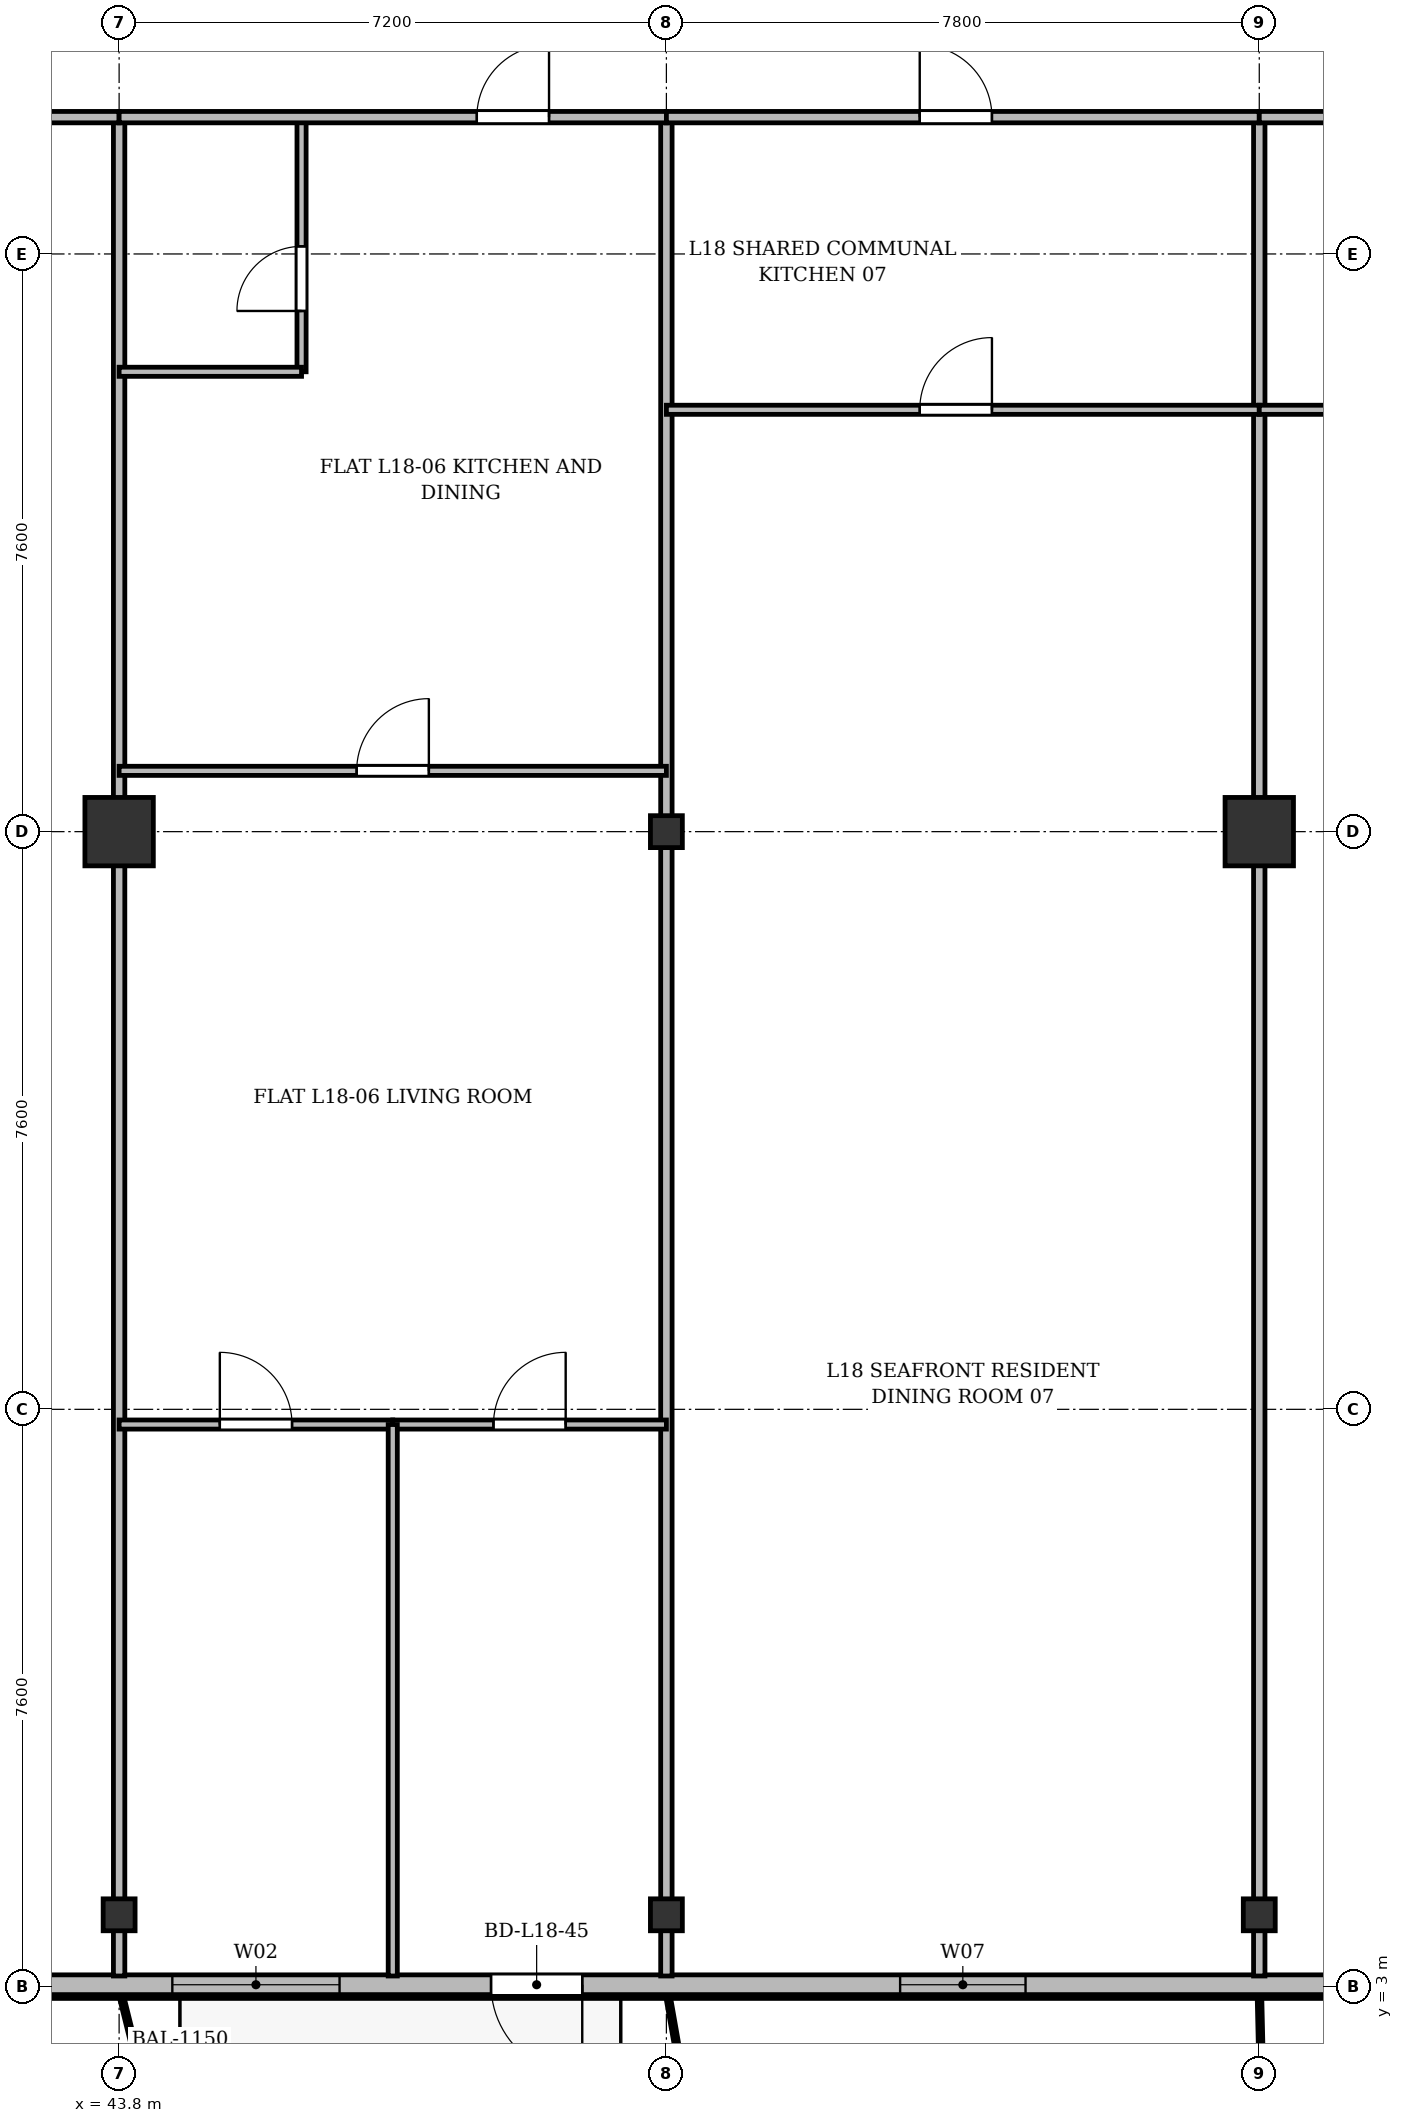
"""IFC4 building model, lengths in metres.
Left out: names, types, materials, properties, quantities, classifications, styles, units other than length and angle.
Written with IfcOpenShell. Run it as: python <this file> out.ifc"""

import sys

from ifc_helpers import new_model, si_unit, direction, frame, frame_2d, origin, origin_2d, place, context, subcontext, project, spatial, rectangle, i_section, extrude, source, transform, mapped, element, fill, save


model = new_model("IFC4")
c1 = context("Model", 3, precision=1e-05, world=origin(), true_north=direction((0.0, 1.0)))
c2 = subcontext(c1, "Body", "Model", "MODEL_VIEW")
j1 = project(units=[si_unit("LENGTHUNIT", "METRE"), si_unit("PLANEANGLEUNIT", "RADIAN")], contexts=[c1])
p1 = place(None, origin())
s1 = spatial("IfcSite", under=j1, at=p1, CompositionType="ELEMENT")
p2 = place(p1, origin())
s2 = spatial("IfcBuilding", under=s1, at=p2, CompositionType="ELEMENT")
p3 = place(p2, frame((0.0, 0.0, 70.3)))
s3 = spatial("IfcBuildingStorey", under=s2, at=p3, CompositionType="ELEMENT", Elevation=70.3)
m1 = source(origin(), c2, "Body", "SweptSolid", [
    extrude(i_section(OverallWidth=0.42, OverallDepth=0.42, WebThickness=0.026, FlangeThickness=0.04, at=origin_2d()), origin(), (0.0, 0.0, 1.0), 3.6),
])
p4 = place(p3, frame((43.8, 3.95, 0.0), z_axis=(0.0, 0.0, 1.0), x_axis=(1.0, 0.0, 0.0)))
e1 = element("IfcColumn", 1, at=p4, inside=s3, PredefinedType="COLUMN", context=c2, shape_type="MappedRepresentation", body=[
    mapped(m1, transform((0.0, 0.0, 0.0), x_axis=(1.0, 0.0, 0.0), y_axis=(0.0, 1.0, 0.0), z_axis=(0.0, 0.0, 1.0), scale=1.0)),
])
m2 = source(origin(), c2, "Body", "SweptSolid", [
    extrude(rectangle(XDim=0.9, YDim=0.9, at=origin_2d()), origin(), (0.0, 0.0, 1.0), 3.6),
])
p5 = place(p3, frame((43.8, 18.2, 0.0), z_axis=(0.0, 0.0, 1.0), x_axis=(1.0, 0.0, 0.0)))
e2 = element("IfcColumn", 2, at=p5, inside=s3, PredefinedType="COLUMN", context=c2, shape_type="MappedRepresentation", body=[
    mapped(m2, transform((0.0, 0.0, 0.0), x_axis=(1.0, 0.0, 0.0), y_axis=(0.0, 1.0, 0.0), z_axis=(0.0, 0.0, 1.0), scale=1.0)),
])
for number, where, z_axis, x_axis in (
    (3, (51.0, 3.95, 0.0), (0.0, 0.0, 1.0), (1.0, 0.0, 0.0)),
    (4, (51.0, 18.2, 0.0), (0.0, 0.0, 1.0), (1.0, 0.0, 0.0)),
    (5, (58.8, 3.95, 0.0), (0.0, 0.0, 1.0), (1.0, 0.0, 0.0)),
):
    element("IfcColumn", number, at=place(p3, frame(where, z_axis=z_axis, x_axis=x_axis)), inside=s3, PredefinedType="COLUMN", context=c2, shape_type="MappedRepresentation", body=[
        mapped(m1, transform((0.0, 0.0, 0.0), x_axis=(1.0, 0.0, 0.0), y_axis=(0.0, 1.0, 0.0), z_axis=(0.0, 0.0, 1.0), scale=1.0)),
    ])
p6 = place(p3, frame((58.8, 18.2, 0.0), z_axis=(0.0, 0.0, 1.0), x_axis=(1.0, 0.0, 0.0)))
e6 = element("IfcColumn", 6, at=p6, inside=s3, PredefinedType="COLUMN", context=c2, shape_type="MappedRepresentation", body=[
    mapped(m2, transform((0.0, 0.0, 0.0), x_axis=(1.0, 0.0, 0.0), y_axis=(0.0, 1.0, 0.0), z_axis=(0.0, 0.0, 1.0), scale=1.0)),
])
p7 = place(p3, frame((66.9, 3.03, 0.0), z_axis=(0.0, 0.0, 1.0), x_axis=(-1.0, 0.0, 0.0)))
e7 = element("IfcWall", 7, at=p7, inside=s3, PredefinedType="SOLIDWALL", context=c2, shape_type="SweptSolid", body=[
    extrude(rectangle(XDim=37.3, YDim=0.26, at=frame_2d((18.65, 0.0))), origin(), (0.0, 0.0, 1.0), 3.22),
])
p8 = place(p7, frame((3.095, 0.0, 0.9)))
e8 = element("IfcOpeningElement", 8, at=p8, cuts=e7, PredefinedType="OPENING", context=c2, shape_type="SweptSolid", body=[
    extrude(rectangle(XDim=2.0, YDim=1.95, at=frame_2d((1.0, 0.975))), frame((0.0, 0.14, 0.0), z_axis=(0.0, -1.0, 0.0), x_axis=(1.0, 0.0, 0.0)), (0.0, 0.0, 1.0), 0.28),
])
p9 = place(p7, frame((11.175, 0.0, 0.9)))
e9 = element("IfcOpeningElement", 9, at=p9, cuts=e7, PredefinedType="OPENING", context=c2, shape_type="SweptSolid", body=[
    extrude(rectangle(XDim=1.65, YDim=1.85, at=frame_2d((0.825, 0.925))), frame((0.0, 0.14, 0.0), z_axis=(0.0, -1.0, 0.0), x_axis=(1.0, 0.0, 0.0)), (0.0, 0.0, 1.0), 0.28),
])
p10 = place(p7, frame((17.007, 0.0, 0.0)))
e10 = element("IfcOpeningElement", 10, at=p10, cuts=e7, PredefinedType="OPENING", context=c2, shape_type="SweptSolid", body=[
    extrude(rectangle(XDim=1.2, YDim=2.2, at=frame_2d((0.6, 1.1))), frame((0.0, 0.14, 0.0), z_axis=(0.0, -1.0, 0.0), x_axis=(1.0, 0.0, 0.0)), (0.0, 0.0, 1.0), 0.28),
])
p11 = place(p7, frame((20.2, 0.0, 0.9)))
e11 = element("IfcOpeningElement", 11, at=p11, cuts=e7, PredefinedType="OPENING", context=c2, shape_type="SweptSolid", body=[
    extrude(rectangle(XDim=2.2, YDim=1.8, at=frame_2d((1.1, 0.9))), frame((0.0, 0.14, 0.0), z_axis=(0.0, -1.0, 0.0), x_axis=(1.0, 0.0, 0.0)), (0.0, 0.0, 1.0), 0.28),
])
p12 = place(p7, frame((28.95, 0.0, 0.9)))
e12 = element("IfcOpeningElement", 12, at=p12, cuts=e7, PredefinedType="OPENING", context=c2, shape_type="SweptSolid", body=[
    extrude(rectangle(XDim=1.5, YDim=1.75, at=frame_2d((0.75, 0.875))), frame((0.0, 0.14, 0.0), z_axis=(0.0, -1.0, 0.0), x_axis=(1.0, 0.0, 0.0)), (0.0, 0.0, 1.0), 0.28),
])
for number, where, z_axis, x_axis in (
    (13, (43.8, 3.145, 0.0), (0.0, 0.0, 1.0), (0.0, 1.0, 0.0)),
    (14, (51.0, 3.145, 0.0), (0.0, 0.0, 1.0), (0.0, 1.0, 0.0)),
    (15, (58.8, 3.145, 0.0), (0.0, 0.0, 1.0), (0.0, 1.0, 0.0)),
):
    element("IfcWall", number, at=place(p3, frame(where, z_axis=z_axis, x_axis=x_axis)), inside=s3, PredefinedType="PARTITIONING", context=c2, shape_type="SweptSolid", body=[
        extrude(rectangle(XDim=24.455, YDim=0.15, at=frame_2d((12.228, 0.0))), origin(), (0.0, 0.0, 1.0), 2.632),
    ])
p13 = place(p3, frame((30.6, 27.6, 0.0), z_axis=(0.0, 0.0, 1.0), x_axis=(1.0, 0.0, 0.0)))
e16 = element("IfcWall", 16, at=p13, inside=s3, PredefinedType="PARTITIONING", context=c2, shape_type="SweptSolid", body=[
    extrude(rectangle(XDim=13.2, YDim=0.15, at=frame_2d((6.6, 0.0))), origin(), (0.0, 0.0, 1.0), 2.632),
])
p14 = place(p13, frame((5.8, 0.0, 0.0)))
e17 = element("IfcOpeningElement", 17, at=p14, cuts=e16, PredefinedType="OPENING", context=c2, shape_type="SweptSolid", body=[
    extrude(rectangle(XDim=1.6, YDim=2.2, at=frame_2d((0.8, 1.1))), frame((0.0, 0.085, 0.0), z_axis=(0.0, -1.0, 0.0), x_axis=(1.0, 0.0, 0.0)), (0.0, 0.0, 1.0), 0.17),
])
p15 = place(p3, frame((43.8, 19.0, 0.0), z_axis=(0.0, 0.0, 1.0), x_axis=(1.0, 0.0, 0.0)))
e18 = element("IfcWall", 18, at=p15, inside=s3, PredefinedType="PARTITIONING", context=c2, shape_type="SweptSolid", body=[
    extrude(rectangle(XDim=7.2, YDim=0.12, at=frame_2d((3.6, 0.0))), origin(), (0.0, 0.0, 1.0), 2.632),
])
p16 = place(p15, frame((3.125, 0.0, 0.0)))
e19 = element("IfcOpeningElement", 19, at=p16, cuts=e18, PredefinedType="OPENING", context=c2, shape_type="SweptSolid", body=[
    extrude(rectangle(XDim=0.95, YDim=2.15, at=frame_2d((0.475, 1.075))), frame((0.0, 0.07, 0.0), z_axis=(0.0, -1.0, 0.0), x_axis=(1.0, 0.0, 0.0)), (0.0, 0.0, 1.0), 0.14),
])
p17 = place(p3, frame((46.2, 24.25, 0.0), z_axis=(0.0, 0.0, 1.0), x_axis=(0.0, 1.0, 0.0)))
e20 = element("IfcWall", 20, at=p17, inside=s3, PredefinedType="PARTITIONING", context=c2, shape_type="SweptSolid", body=[
    extrude(rectangle(XDim=3.35, YDim=0.12, at=frame_2d((1.675, 0.0))), origin(), (0.0, 0.0, 1.0), 2.82),
])
p18 = place(p17, frame((0.8, 0.0, 0.0)))
e21 = element("IfcOpeningElement", 21, at=p18, cuts=e20, PredefinedType="OPENING", context=c2, shape_type="SweptSolid", body=[
    extrude(rectangle(XDim=0.85, YDim=2.1, at=frame_2d((0.425, 1.05))), frame((0.0, 0.07, 0.0), z_axis=(0.0, -1.0, 0.0), x_axis=(1.0, 0.0, 0.0)), (0.0, 0.0, 1.0), 0.14),
])
p19 = place(p3, frame((43.8, 24.25, 0.0), z_axis=(0.0, 0.0, 1.0), x_axis=(1.0, 0.0, 0.0)))
e22 = element("IfcWall", 22, at=p19, inside=s3, PredefinedType="PARTITIONING", context=c2, shape_type="SweptSolid", body=[
    extrude(rectangle(XDim=2.4, YDim=0.12, at=frame_2d((1.2, 0.0))), origin(), (0.0, 0.0, 1.0), 2.632),
])
p20 = place(p3, frame((43.8, 27.6, 0.0), z_axis=(0.0, 0.0, 1.0), x_axis=(1.0, 0.0, 0.0)))
e23 = element("IfcWall", 23, at=p20, inside=s3, PredefinedType="PARTITIONING", context=c2, shape_type="SweptSolid", body=[
    extrude(rectangle(XDim=7.2, YDim=0.15, at=frame_2d((3.6, 0.0))), origin(), (0.0, 0.0, 1.0), 2.632),
])
p21 = place(p20, frame((4.706, 0.0, 0.0)))
e24 = element("IfcOpeningElement", 24, at=p21, cuts=e23, PredefinedType="OPENING", context=c2, shape_type="SweptSolid", body=[
    extrude(rectangle(XDim=0.95, YDim=2.15, at=frame_2d((0.475, 1.075))), frame((0.0, 0.085, 0.0), z_axis=(0.0, -1.0, 0.0), x_axis=(1.0, 0.0, 0.0)), (0.0, 0.0, 1.0), 0.17),
])
p22 = place(p3, frame((43.8, 10.4, 0.0), z_axis=(0.0, 0.0, 1.0), x_axis=(1.0, 0.0, 0.0)))
e25 = element("IfcWall", 25, at=p22, inside=s3, PredefinedType="PARTITIONING", context=c2, shape_type="SweptSolid", body=[
    extrude(rectangle(XDim=3.6, YDim=0.12, at=frame_2d((1.8, 0.0))), origin(), (0.0, 0.0, 1.0), 2.632),
])
p23 = place(p22, frame((1.325, 0.0, 0.0)))
e26 = element("IfcOpeningElement", 26, at=p23, cuts=e25, PredefinedType="OPENING", context=c2, shape_type="SweptSolid", body=[
    extrude(rectangle(XDim=0.95, YDim=2.15, at=frame_2d((0.475, 1.075))), frame((0.0, 0.07, 0.0), z_axis=(0.0, -1.0, 0.0), x_axis=(1.0, 0.0, 0.0)), (0.0, 0.0, 1.0), 0.14),
])
p24 = place(p3, frame((47.4, 10.4, 0.0), z_axis=(0.0, 0.0, 1.0), x_axis=(1.0, 0.0, 0.0)))
e27 = element("IfcWall", 27, at=p24, inside=s3, PredefinedType="PARTITIONING", context=c2, shape_type="SweptSolid", body=[
    extrude(rectangle(XDim=3.6, YDim=0.12, at=frame_2d((1.8, 0.0))), origin(), (0.0, 0.0, 1.0), 2.632),
])
p25 = place(p24, frame((1.325, 0.0, 0.0)))
e28 = element("IfcOpeningElement", 28, at=p25, cuts=e27, PredefinedType="OPENING", context=c2, shape_type="SweptSolid", body=[
    extrude(rectangle(XDim=0.95, YDim=2.15, at=frame_2d((0.475, 1.075))), frame((0.0, 0.07, 0.0), z_axis=(0.0, -1.0, 0.0), x_axis=(1.0, 0.0, 0.0)), (0.0, 0.0, 1.0), 0.14),
])
p26 = place(p3, frame((47.4, 3.145, 0.0), z_axis=(0.0, 0.0, 1.0), x_axis=(0.0, 1.0, 0.0)))
e29 = element("IfcWall", 29, at=p26, inside=s3, PredefinedType="PARTITIONING", context=c2, shape_type="SweptSolid", body=[
    extrude(rectangle(XDim=7.255, YDim=0.12, at=frame_2d((3.627, 0.0))), origin(), (0.0, 0.0, 1.0), 2.57),
])
p27 = place(p3, frame((51.0, 27.6, 0.0), z_axis=(0.0, 0.0, 1.0), x_axis=(1.0, 0.0, 0.0)))
e30 = element("IfcWall", 30, at=p27, inside=s3, PredefinedType="PARTITIONING", context=c2, shape_type="SweptSolid", body=[
    extrude(rectangle(XDim=7.8, YDim=0.15, at=frame_2d((3.9, 0.0))), origin(), (0.0, 0.0, 1.0), 2.632),
])
p28 = place(p27, frame((3.333, 0.0, 0.0)))
e31 = element("IfcOpeningElement", 31, at=p28, cuts=e30, PredefinedType="OPENING", context=c2, shape_type="SweptSolid", body=[
    extrude(rectangle(XDim=0.95, YDim=2.15, at=frame_2d((0.475, 1.075))), frame((0.0, 0.085, 0.0), z_axis=(0.0, -1.0, 0.0), x_axis=(1.0, 0.0, 0.0)), (0.0, 0.0, 1.0), 0.17),
])
p29 = place(p3, frame((51.0, 23.75, 0.0), z_axis=(0.0, 0.0, 1.0), x_axis=(1.0, 0.0, 0.0)))
e32 = element("IfcWall", 32, at=p29, inside=s3, PredefinedType="PARTITIONING", context=c2, shape_type="SweptSolid", body=[
    extrude(rectangle(XDim=7.8, YDim=0.12, at=frame_2d((3.9, 0.0))), origin(), (0.0, 0.0, 1.0), 2.632),
])
p30 = place(p29, frame((3.333, 0.0, 0.0)))
e33 = element("IfcOpeningElement", 33, at=p30, cuts=e32, PredefinedType="OPENING", context=c2, shape_type="SweptSolid", body=[
    extrude(rectangle(XDim=0.95, YDim=2.15, at=frame_2d((0.475, 1.075))), frame((0.0, 0.07, 0.0), z_axis=(0.0, -1.0, 0.0), x_axis=(1.0, 0.0, 0.0)), (0.0, 0.0, 1.0), 0.14),
])
p31 = place(p3, frame((58.8, 27.6, 0.0), z_axis=(0.0, 0.0, 1.0), x_axis=(1.0, 0.0, 0.0)))
e34 = element("IfcWall", 34, at=p31, inside=s3, PredefinedType="PARTITIONING", context=c2, shape_type="SweptSolid", body=[
    extrude(rectangle(XDim=10.855, YDim=0.15, at=frame_2d((5.427, 0.0))), origin(), (0.0, 0.0, 1.0), 2.632),
])
p32 = place(p31, frame((4.953, 0.0, 0.0)))
e35 = element("IfcOpeningElement", 35, at=p32, cuts=e34, PredefinedType="OPENING", context=c2, shape_type="SweptSolid", body=[
    extrude(rectangle(XDim=0.95, YDim=2.15, at=frame_2d((0.475, 1.075))), frame((0.0, 0.085, 0.0), z_axis=(0.0, -1.0, 0.0), x_axis=(1.0, 0.0, 0.0)), (0.0, 0.0, 1.0), 0.17),
])
p33 = place(p3, frame((58.8, 23.75, 0.0), z_axis=(0.0, 0.0, 1.0), x_axis=(1.0, 0.0, 0.0)))
e36 = element("IfcWall", 36, at=p33, inside=s3, PredefinedType="PARTITIONING", context=c2, shape_type="SweptSolid", body=[
    extrude(rectangle(XDim=10.855, YDim=0.12, at=frame_2d((5.427, 0.0))), origin(), (0.0, 0.0, 1.0), 2.632),
])
p34 = place(p33, frame((4.953, 0.0, 0.0)))
e37 = element("IfcOpeningElement", 37, at=p34, cuts=e36, PredefinedType="OPENING", context=c2, shape_type="SweptSolid", body=[
    extrude(rectangle(XDim=0.95, YDim=2.15, at=frame_2d((0.475, 1.075))), frame((0.0, 0.07, 0.0), z_axis=(0.0, -1.0, 0.0), x_axis=(1.0, 0.0, 0.0)), (0.0, 0.0, 1.0), 0.14),
])
m3 = source(origin(), c2, "Body", "SweptSolid", [
    extrude(rectangle(XDim=1.65, YDim=1.85, at=frame_2d((0.825, 0.925))), frame((0.0, 0.03, 0.0), z_axis=(0.0, -1.0, 0.0), x_axis=(1.0, 0.0, 0.0)), (0.0, 0.0, 1.0), 0.06),
])
p35 = place(p9, origin())
e38 = element("IfcWindow", 38, at=p35, inside=s3, PartitioningType="SINGLE_PANEL", PredefinedType="WINDOW", context=c2, shape_type="MappedRepresentation", body=[
    mapped(m3, transform((0.0, 0.0, 0.0), x_axis=(1.0, 0.0, 0.0), y_axis=(0.0, 1.0, 0.0), z_axis=(0.0, 0.0, 1.0), scale=1.0)),
])
fill(e9, e38)
m4 = source(origin(), c2, "Body", "SweptSolid", [
    extrude(rectangle(XDim=1.2, YDim=2.2, at=frame_2d((0.6, 1.1))), frame((0.0, 0.025, 0.0), z_axis=(0.0, -1.0, 0.0), x_axis=(1.0, 0.0, 0.0)), (0.0, 0.0, 1.0), 0.05),
])
p36 = place(p10, origin())
e39 = element("IfcDoor", 39, at=p36, inside=s3, OperationType="SINGLE_SWING_LEFT", PredefinedType="DOOR", context=c2, shape_type="MappedRepresentation", body=[
    mapped(m4, transform((0.0, 0.0, 0.0), x_axis=(1.0, 0.0, 0.0), y_axis=(0.0, 1.0, 0.0), z_axis=(0.0, 0.0, 1.0), scale=1.0)),
])
fill(e10, e39)
m5 = source(origin(), c2, "Body", "SweptSolid", [
    extrude(rectangle(XDim=2.2, YDim=1.8, at=frame_2d((1.1, 0.9))), frame((0.0, 0.03, 0.0), z_axis=(0.0, -1.0, 0.0), x_axis=(1.0, 0.0, 0.0)), (0.0, 0.0, 1.0), 0.06),
])
p37 = place(p11, origin())
e40 = element("IfcWindow", 40, at=p37, inside=s3, PartitioningType="SINGLE_PANEL", PredefinedType="WINDOW", context=c2, shape_type="MappedRepresentation", body=[
    mapped(m5, transform((0.0, 0.0, 0.0), x_axis=(1.0, 0.0, 0.0), y_axis=(0.0, 1.0, 0.0), z_axis=(0.0, 0.0, 1.0), scale=1.0)),
])
fill(e11, e40)
m6 = source(origin(), c2, "Body", "SweptSolid", [
    extrude(rectangle(XDim=0.95, YDim=2.15, at=frame_2d((0.475, 1.075))), frame((0.0, 0.025, 0.0), z_axis=(0.0, -1.0, 0.0), x_axis=(1.0, 0.0, 0.0)), (0.0, 0.0, 1.0), 0.05),
])
p38 = place(p16, origin())
e41 = element("IfcDoor", 41, at=p38, inside=s3, OperationType="SINGLE_SWING_RIGHT", PredefinedType="DOOR", context=c2, shape_type="MappedRepresentation", body=[
    mapped(m6, transform((0.0, 0.0, 0.0), x_axis=(1.0, 0.0, 0.0), y_axis=(0.0, 1.0, 0.0), z_axis=(0.0, 0.0, 1.0), scale=1.0)),
])
fill(e19, e41)
m7 = source(origin(), c2, "Body", "SweptSolid", [
    extrude(rectangle(XDim=0.85, YDim=2.1, at=frame_2d((0.425, 1.05))), frame((0.0, 0.025, 0.0), z_axis=(0.0, -1.0, 0.0), x_axis=(1.0, 0.0, 0.0)), (0.0, 0.0, 1.0), 0.05),
])
p39 = place(p18, origin())
e42 = element("IfcDoor", 42, at=p39, inside=s3, OperationType="SINGLE_SWING_LEFT", PredefinedType="DOOR", context=c2, shape_type="MappedRepresentation", body=[
    mapped(m7, transform((0.0, 0.0, 0.0), x_axis=(1.0, 0.0, 0.0), y_axis=(0.0, 1.0, 0.0), z_axis=(0.0, 0.0, 1.0), scale=1.0)),
])
fill(e21, e42)
p40 = place(p21, origin())
e43 = element("IfcDoor", 43, at=p40, inside=s3, OperationType="SINGLE_SWING_RIGHT", PredefinedType="DOOR", context=c2, shape_type="MappedRepresentation", body=[
    mapped(m6, transform((0.0, 0.0, 0.0), x_axis=(1.0, 0.0, 0.0), y_axis=(0.0, 1.0, 0.0), z_axis=(0.0, 0.0, 1.0), scale=1.0)),
])
fill(e24, e43)
p41 = place(p23, origin())
e44 = element("IfcDoor", 44, at=p41, inside=s3, OperationType="SINGLE_SWING_LEFT", PredefinedType="DOOR", context=c2, shape_type="MappedRepresentation", body=[
    mapped(m6, transform((0.0, 0.0, 0.0), x_axis=(1.0, 0.0, 0.0), y_axis=(0.0, 1.0, 0.0), z_axis=(0.0, 0.0, 1.0), scale=1.0)),
])
fill(e26, e44)
p42 = place(p25, origin())
e45 = element("IfcDoor", 45, at=p42, inside=s3, OperationType="SINGLE_SWING_RIGHT", PredefinedType="DOOR", context=c2, shape_type="MappedRepresentation", body=[
    mapped(m6, transform((0.0, 0.0, 0.0), x_axis=(1.0, 0.0, 0.0), y_axis=(0.0, 1.0, 0.0), z_axis=(0.0, 0.0, 1.0), scale=1.0)),
])
fill(e28, e45)
p43 = place(p28, origin())
e46 = element("IfcDoor", 46, at=p43, inside=s3, OperationType="SINGLE_SWING_LEFT", PredefinedType="DOOR", context=c2, shape_type="MappedRepresentation", body=[
    mapped(m6, transform((0.0, 0.0, 0.0), x_axis=(1.0, 0.0, 0.0), y_axis=(0.0, 1.0, 0.0), z_axis=(0.0, 0.0, 1.0), scale=1.0)),
])
fill(e31, e46)
p44 = place(p30, origin())
e47 = element("IfcDoor", 47, at=p44, inside=s3, OperationType="SINGLE_SWING_RIGHT", PredefinedType="DOOR", context=c2, shape_type="MappedRepresentation", body=[
    mapped(m6, transform((0.0, 0.0, 0.0), x_axis=(1.0, 0.0, 0.0), y_axis=(0.0, 1.0, 0.0), z_axis=(0.0, 0.0, 1.0), scale=1.0)),
])
fill(e33, e47)
save(model, sys.argv[1])
